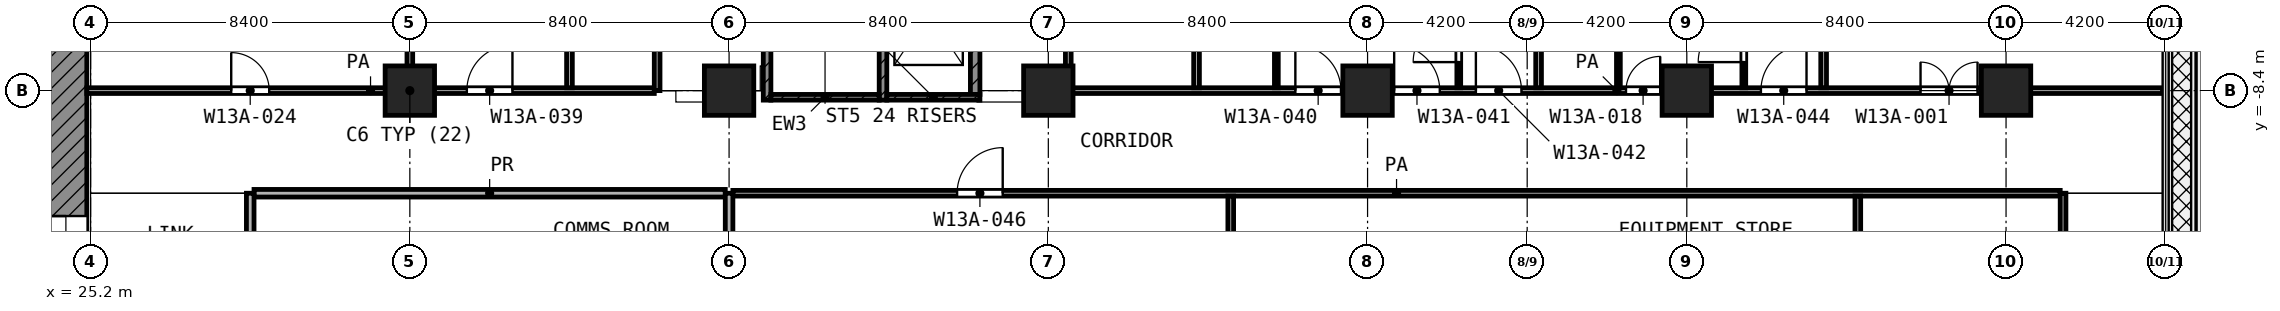
"""IFC4 building model, lengths in metres.
Left out: names, types, materials, properties, quantities, classifications, styles, units other than length and angle.
Written with IfcOpenShell. Run it as: python <this file> out.ifc"""

import sys

from ifc_helpers import new_model, si_unit, direction, frame, frame_2d, origin, origin_2d, place, context, subcontext, project, spatial, rectangle, extrude, element, fill, save


model = new_model("IFC4")
c1 = context("Model", 3, precision=1e-05, world=origin(), true_north=direction((0.0, 1.0)))
c2 = subcontext(c1, "Body", "Model", "MODEL_VIEW")
j1 = project(units=[si_unit("LENGTHUNIT", "METRE"), si_unit("PLANEANGLEUNIT", "RADIAN")], contexts=[c1])
p1 = place(None, origin())
s1 = spatial("IfcSite", under=j1, at=p1, CompositionType="ELEMENT")
p2 = place(p1, origin())
s2 = spatial("IfcBuilding", under=s1, at=p2, CompositionType="ELEMENT")
p3 = place(p2, frame((0.0, 0.0, 60.2)))
s3 = spatial("IfcBuildingStorey", under=s2, at=p3, CompositionType="ELEMENT", Elevation=60.2)
for number, where, z_axis, x_axis in (
    (1, (33.6, -8.4, 0.0), (0.0, 0.0, 1.0), (1.0, 0.0, 0.0)),
    (2, (42.0, -8.4, 0.0), (0.0, 0.0, 1.0), (1.0, 0.0, 0.0)),
    (3, (50.4, -8.4, 0.0), (0.0, 0.0, 1.0), (1.0, 0.0, 0.0)),
    (4, (58.8, -8.4, 0.0), (0.0, 0.0, 1.0), (1.0, 0.0, 0.0)),
    (5, (67.2, -8.4, 0.0), (0.0, 0.0, 1.0), (1.0, 0.0, 0.0)),
    (6, (75.6, -8.4, 0.0), (0.0, 0.0, 1.0), (1.0, 0.0, 0.0)),
):
    element("IfcColumn", number, at=place(p3, frame(where, z_axis=z_axis, x_axis=x_axis)), inside=s3, PredefinedType="COLUMN", context=c2, shape_type="SweptSolid", body=[
        extrude(rectangle(XDim=1.3, YDim=1.3, at=origin_2d()), origin(), (0.0, 0.0, 1.0), 4.2),
    ])
p4 = place(p3, frame((24.55, -24.0, 0.0), z_axis=(0.0, 0.0, 1.0), x_axis=(0.0, 1.0, 0.0)))
e7 = element("IfcWall", 7, at=p4, inside=s3, PredefinedType="SHEAR", context=c2, shape_type="SweptSolid", body=[
    extrude(rectangle(XDim=18.6, YDim=1.1, at=frame_2d((9.3, 0.0))), origin(), (0.0, 0.0, 1.0), 3.9),
])
p5 = place(p4, frame((10.5, 0.0, 0.0)))
e8 = element("IfcOpeningElement", 8, at=p5, cuts=e7, PredefinedType="OPENING", context=c2, shape_type="SweptSolid", body=[
    extrude(rectangle(XDim=1.8, YDim=2.1, at=frame_2d((0.9, 1.05))), frame((0.0, 0.56, 0.0), z_axis=(0.0, -1.0, 0.0), x_axis=(1.0, 0.0, 0.0)), (0.0, 0.0, 1.0), 1.12),
])
p6 = place(p3, frame((43.0, -8.65, 0.0), z_axis=(0.0, 0.0, 1.0), x_axis=(0.0, 1.0, 0.0)))
e9 = element("IfcWall", 9, at=p6, inside=s3, PredefinedType="SHEAR", context=c2, shape_type="SweptSolid", body=[
    extrude(rectangle(XDim=8.35, YDim=0.2, at=frame_2d((4.175, 0.0))), origin(), (0.0, 0.0, 1.0), 3.9),
])
p7 = place(p6, frame((7.0, 0.0, 0.0)))
e10 = element("IfcOpeningElement", 10, at=p7, cuts=e9, PredefinedType="OPENING", context=c2, shape_type="SweptSolid", body=[
    extrude(rectangle(XDim=1.1, YDim=2.1, at=frame_2d((0.55, 1.05))), frame((0.0, 0.11, 0.0), z_axis=(0.0, -1.0, 0.0), x_axis=(1.0, 0.0, 0.0)), (0.0, 0.0, 1.0), 0.22),
])
p8 = place(p3, frame((46.05, -8.65, 0.0), z_axis=(0.0, 0.0, 1.0), x_axis=(0.0, 1.0, 0.0)))
e11 = element("IfcWall", 11, at=p8, inside=s3, PredefinedType="SHEAR", context=c2, shape_type="SweptSolid", body=[
    extrude(rectangle(XDim=8.35, YDim=0.2, at=frame_2d((4.175, 0.0))), origin(), (0.0, 0.0, 1.0), 3.9),
])
p9 = place(p8, frame((7.0, 0.0, 0.0)))
e12 = element("IfcOpeningElement", 12, at=p9, cuts=e11, PredefinedType="OPENING", context=c2, shape_type="SweptSolid", body=[
    extrude(rectangle(XDim=1.1, YDim=2.1, at=frame_2d((0.55, 1.05))), frame((0.0, 0.11, 0.0), z_axis=(0.0, -1.0, 0.0), x_axis=(1.0, 0.0, 0.0)), (0.0, 0.0, 1.0), 0.22),
])
p10 = place(p3, frame((43.1, -8.575, 0.0), z_axis=(0.0, 0.0, 1.0), x_axis=(1.0, 0.0, 0.0)))
e13 = element("IfcWall", 13, at=p10, inside=s3, PredefinedType="SHEAR", context=c2, shape_type="SweptSolid", body=[
    extrude(rectangle(XDim=2.85, YDim=0.15, at=frame_2d((1.425, 0.0))), origin(), (0.0, 0.0, 1.0), 3.9),
])
p11 = place(p3, frame((46.15, -8.575, 0.0), z_axis=(0.0, 0.0, 1.0), x_axis=(1.0, 0.0, 0.0)))
e14 = element("IfcWall", 14, at=p11, inside=s3, PredefinedType="SHEAR", context=c2, shape_type="SweptSolid", body=[
    extrude(rectangle(XDim=2.45, YDim=0.15, at=frame_2d((1.225, 0.0))), origin(), (0.0, 0.0, 1.0), 3.9),
])
p12 = place(p3, frame((48.475, -8.5, 0.0), z_axis=(0.0, 0.0, 1.0), x_axis=(0.0, 1.0, 0.0)))
e15 = element("IfcWall", 15, at=p12, inside=s3, PredefinedType="SHEAR", context=c2, shape_type="SweptSolid", body=[
    extrude(rectangle(XDim=3.475, YDim=0.25, at=frame_2d((1.738, 0.0))), origin(), (0.0, 0.0, 1.0), 3.9),
])
p13 = place(p3, frame((56.4, -8.325, 0.0), z_axis=(0.0, 0.0, 1.0), x_axis=(0.0, 1.0, 0.0)))
e16 = element("IfcWall", 16, at=p13, inside=s3, PredefinedType="PARTITIONING", context=c2, shape_type="SweptSolid", body=[
    extrude(rectangle(XDim=2.625, YDim=0.1, at=frame_2d((1.312, 0.0))), origin(), (0.0, 0.0, 1.0), 3.9),
])
p14 = place(p3, frame((61.2, -8.325, 0.0), z_axis=(0.0, 0.0, 1.0), x_axis=(0.0, 1.0, 0.0)))
e17 = element("IfcWall", 17, at=p14, inside=s3, PredefinedType="PARTITIONING", context=c2, shape_type="SweptSolid", body=[
    extrude(rectangle(XDim=2.625, YDim=0.1, at=frame_2d((1.312, 0.0))), origin(), (0.0, 0.0, 1.0), 3.9),
])
p15 = place(p14, frame((0.675, 0.0, 0.0)))
e18 = element("IfcOpeningElement", 18, at=p15, cuts=e17, PredefinedType="OPENING", context=c2, shape_type="SweptSolid", body=[
    extrude(rectangle(XDim=1.2, YDim=2.1, at=frame_2d((0.6, 1.05))), frame((0.0, 0.06, 0.0), z_axis=(0.0, -1.0, 0.0), x_axis=(1.0, 0.0, 0.0)), (0.0, 0.0, 1.0), 0.12),
])
p16 = place(p3, frame((65.4, -8.325, 0.0), z_axis=(0.0, 0.0, 1.0), x_axis=(0.0, 1.0, 0.0)))
e19 = element("IfcWall", 19, at=p16, inside=s3, PredefinedType="PARTITIONING", context=c2, shape_type="SweptSolid", body=[
    extrude(rectangle(XDim=2.625, YDim=0.1, at=frame_2d((1.312, 0.0))), origin(), (0.0, 0.0, 1.0), 3.9),
])
p17 = place(p3, frame((68.7, -8.325, 0.0), z_axis=(0.0, 0.0, 1.0), x_axis=(0.0, 1.0, 0.0)))
e20 = element("IfcWall", 20, at=p17, inside=s3, PredefinedType="PARTITIONING", context=c2, shape_type="SweptSolid", body=[
    extrude(rectangle(XDim=2.625, YDim=0.1, at=frame_2d((1.312, 0.0))), origin(), (0.0, 0.0, 1.0), 3.9),
])
p18 = place(p17, frame((0.675, 0.0, 0.0)))
e21 = element("IfcOpeningElement", 21, at=p18, cuts=e20, PredefinedType="OPENING", context=c2, shape_type="SweptSolid", body=[
    extrude(rectangle(XDim=1.2, YDim=2.1, at=frame_2d((0.6, 1.05))), frame((0.0, 0.06, 0.0), z_axis=(0.0, -1.0, 0.0), x_axis=(1.0, 0.0, 0.0)), (0.0, 0.0, 1.0), 0.12),
])
p19 = place(p3, frame((42.1, -11.1, 0.0), z_axis=(0.0, 0.0, 1.0), x_axis=(1.0, 0.0, 0.0)))
e22 = element("IfcWall", 22, at=p19, inside=s3, PredefinedType="PARTITIONING", context=c2, shape_type="SweptSolid", body=[
    extrude(rectangle(XDim=34.925, YDim=0.15, at=frame_2d((17.462, 0.0))), origin(), (0.0, 0.0, 1.0), 3.9),
])
p20 = place(p19, frame((5.9, 0.0, 0.0)))
e23 = element("IfcOpeningElement", 23, at=p20, cuts=e22, PredefinedType="OPENING", context=c2, shape_type="SweptSolid", body=[
    extrude(rectangle(XDim=1.2, YDim=2.1, at=frame_2d((0.6, 1.05))), frame((0.0, 0.085, 0.0), z_axis=(0.0, -1.0, 0.0), x_axis=(1.0, 0.0, 0.0)), (0.0, 0.0, 1.0), 0.17),
])
p21 = place(p3, frame((25.1, -8.4, 0.0), z_axis=(0.0, 0.0, 1.0), x_axis=(1.0, 0.0, 0.0)))
e24 = element("IfcWall", 24, at=p21, inside=s3, PredefinedType="PARTITIONING", context=c2, shape_type="SweptSolid", body=[
    extrude(rectangle(XDim=14.932, YDim=0.15, at=frame_2d((7.466, 0.0))), origin(), (0.0, 0.0, 1.0), 3.9),
])
p22 = place(p21, frame((3.8, 0.0, 0.0)))
e25 = element("IfcOpeningElement", 25, at=p22, cuts=e24, PredefinedType="OPENING", context=c2, shape_type="SweptSolid", body=[
    extrude(rectangle(XDim=1.0, YDim=2.1, at=frame_2d((0.5, 1.05))), frame((0.0, 0.085, 0.0), z_axis=(0.0, -1.0, 0.0), x_axis=(1.0, 0.0, 0.0)), (0.0, 0.0, 1.0), 0.17),
])
p23 = place(p21, frame((10.0, 0.0, 0.0)))
e26 = element("IfcOpeningElement", 26, at=p23, cuts=e24, PredefinedType="OPENING", context=c2, shape_type="SweptSolid", body=[
    extrude(rectangle(XDim=1.2, YDim=2.1, at=frame_2d((0.6, 1.05))), frame((0.0, 0.085, 0.0), z_axis=(0.0, -1.0, 0.0), x_axis=(1.0, 0.0, 0.0)), (0.0, 0.0, 1.0), 0.17),
])
p24 = place(p3, frame((51.0, -8.4, 0.0), z_axis=(0.0, 0.0, 1.0), x_axis=(1.0, 0.0, 0.0)))
e27 = element("IfcWall", 27, at=p24, inside=s3, PredefinedType="PARTITIONING", context=c2, shape_type="SweptSolid", body=[
    extrude(rectangle(XDim=28.72, YDim=0.15, at=frame_2d((14.36, 0.0))), origin(), (0.0, 0.0, 1.0), 3.9),
])
p25 = place(p24, frame((5.9, 0.0, 0.0)))
e28 = element("IfcOpeningElement", 28, at=p25, cuts=e27, PredefinedType="OPENING", context=c2, shape_type="SweptSolid", body=[
    extrude(rectangle(XDim=1.2, YDim=2.1, at=frame_2d((0.6, 1.05))), frame((0.0, 0.085, 0.0), z_axis=(0.0, -1.0, 0.0), x_axis=(1.0, 0.0, 0.0)), (0.0, 0.0, 1.0), 0.17),
])
p26 = place(p24, frame((8.5, 0.0, 0.0)))
e29 = element("IfcOpeningElement", 29, at=p26, cuts=e27, PredefinedType="OPENING", context=c2, shape_type="SweptSolid", body=[
    extrude(rectangle(XDim=1.2, YDim=2.1, at=frame_2d((0.6, 1.05))), frame((0.0, 0.085, 0.0), z_axis=(0.0, -1.0, 0.0), x_axis=(1.0, 0.0, 0.0)), (0.0, 0.0, 1.0), 0.17),
])
p27 = place(p24, frame((10.65, 0.0, 0.0)))
e30 = element("IfcOpeningElement", 30, at=p27, cuts=e27, PredefinedType="OPENING", context=c2, shape_type="SweptSolid", body=[
    extrude(rectangle(XDim=1.2, YDim=2.1, at=frame_2d((0.6, 1.05))), frame((0.0, 0.085, 0.0), z_axis=(0.0, -1.0, 0.0), x_axis=(1.0, 0.0, 0.0)), (0.0, 0.0, 1.0), 0.17),
])
p28 = place(p24, frame((14.6, 0.0, 0.0)))
e31 = element("IfcOpeningElement", 31, at=p28, cuts=e27, PredefinedType="OPENING", context=c2, shape_type="SweptSolid", body=[
    extrude(rectangle(XDim=0.9, YDim=2.1, at=frame_2d((0.45, 1.05))), frame((0.0, 0.085, 0.0), z_axis=(0.0, -1.0, 0.0), x_axis=(1.0, 0.0, 0.0)), (0.0, 0.0, 1.0), 0.17),
])
p29 = place(p24, frame((18.15, 0.0, 0.0)))
e32 = element("IfcOpeningElement", 32, at=p29, cuts=e27, PredefinedType="OPENING", context=c2, shape_type="SweptSolid", body=[
    extrude(rectangle(XDim=1.2, YDim=2.1, at=frame_2d((0.6, 1.05))), frame((0.0, 0.085, 0.0), z_axis=(0.0, -1.0, 0.0), x_axis=(1.0, 0.0, 0.0)), (0.0, 0.0, 1.0), 0.17),
])
p30 = place(p24, frame((22.35, 0.0, 0.0)))
e33 = element("IfcOpeningElement", 33, at=p30, cuts=e27, PredefinedType="OPENING", context=c2, shape_type="SweptSolid", body=[
    extrude(rectangle(XDim=1.5, YDim=2.1, at=frame_2d((0.75, 1.05))), frame((0.0, 0.085, 0.0), z_axis=(0.0, -1.0, 0.0), x_axis=(1.0, 0.0, 0.0)), (0.0, 0.0, 1.0), 0.17),
])
for number, where, z_axis, x_axis in (
    (34, (33.6, -8.325, 0.0), (0.0, 0.0, 1.0), (0.0, 1.0, 0.0)),
    (35, (37.8, -8.325, 0.0), (0.0, 0.0, 1.0), (0.0, 1.0, 0.0)),
):
    element("IfcWall", number, at=place(p3, frame(where, z_axis=z_axis, x_axis=x_axis)), inside=s3, PredefinedType="PARTITIONING", context=c2, shape_type="SweptSolid", body=[
        extrude(rectangle(XDim=8.245, YDim=0.15, at=frame_2d((4.123, 0.0))), origin(), (0.0, 0.0, 1.0), 3.9),
    ])
p31 = place(p3, frame((40.107, -8.4, 0.0), z_axis=(0.0, 0.0, 1.0), x_axis=(0.0, 1.0, 0.0)))
e36 = element("IfcWall", 36, at=p31, inside=s3, PredefinedType="PARTITIONING", context=c2, shape_type="SweptSolid", body=[
    extrude(rectangle(XDim=8.048, YDim=0.15, at=frame_2d((4.024, 0.0))), origin(), (0.0, 0.0, 1.0), 3.9),
])
p32 = place(p31, frame((3.524, 0.0, 0.0)))
e37 = element("IfcOpeningElement", 37, at=p32, cuts=e36, PredefinedType="OPENING", context=c2, shape_type="SweptSolid", body=[
    extrude(rectangle(XDim=1.0, YDim=2.1, at=frame_2d((0.5, 1.05))), frame((0.0, 0.085, 0.0), z_axis=(0.0, -1.0, 0.0), x_axis=(1.0, 0.0, 0.0)), (0.0, 0.0, 1.0), 0.17),
])
p33 = place(p3, frame((50.925, -8.4, 0.0), z_axis=(0.0, 0.0, 1.0), x_axis=(0.0, 1.0, 0.0)))
e38 = element("IfcWall", 38, at=p33, inside=s3, PredefinedType="PARTITIONING", context=c2, shape_type="SweptSolid", body=[
    extrude(rectangle(XDim=6.548, YDim=0.15, at=frame_2d((3.274, 0.0))), origin(), (0.0, 0.0, 1.0), 3.9),
])
p34 = place(p33, frame((2.774, 0.0, 0.0)))
e39 = element("IfcOpeningElement", 39, at=p34, cuts=e38, PredefinedType="OPENING", context=c2, shape_type="SweptSolid", body=[
    extrude(rectangle(XDim=1.0, YDim=2.1, at=frame_2d((0.5, 1.05))), frame((0.0, 0.085, 0.0), z_axis=(0.0, -1.0, 0.0), x_axis=(1.0, 0.0, 0.0)), (0.0, 0.0, 1.0), 0.17),
])
p35 = place(p3, frame((54.3, -8.325, 0.0), z_axis=(0.0, 0.0, 1.0), x_axis=(0.0, 1.0, 0.0)))
e40 = element("IfcWall", 40, at=p35, inside=s3, PredefinedType="PARTITIONING", context=c2, shape_type="SweptSolid", body=[
    extrude(rectangle(XDim=8.245, YDim=0.15, at=frame_2d((4.123, 0.0))), origin(), (0.0, 0.0, 1.0), 3.9),
])
p36 = place(p3, frame((55.2, -14.025, 0.0), z_axis=(0.0, 0.0, 1.0), x_axis=(0.0, 1.0, 0.0)))
e41 = element("IfcWall", 41, at=p36, inside=s3, PredefinedType="PARTITIONING", context=c2, shape_type="SweptSolid", body=[
    extrude(rectangle(XDim=2.85, YDim=0.15, at=frame_2d((1.425, 0.0))), origin(), (0.0, 0.0, 1.0), 3.9),
])
for number, where, z_axis, x_axis in (
    (42, (63.3, -8.325, 0.0), (0.0, 0.0, 1.0), (0.0, 1.0, 0.0)),
    (43, (70.8, -8.325, 0.0), (0.0, 0.0, 1.0), (0.0, 1.0, 0.0)),
):
    element("IfcWall", number, at=place(p3, frame(where, z_axis=z_axis, x_axis=x_axis)), inside=s3, PredefinedType="PARTITIONING", context=c2, shape_type="SweptSolid", body=[
        extrude(rectangle(XDim=8.245, YDim=0.15, at=frame_2d((4.123, 0.0))), origin(), (0.0, 0.0, 1.0), 3.9),
    ])
p37 = place(p3, frame((71.7, -14.025, 0.0), z_axis=(0.0, 0.0, 1.0), x_axis=(0.0, 1.0, 0.0)))
e44 = element("IfcWall", 44, at=p37, inside=s3, PredefinedType="PARTITIONING", context=c2, shape_type="SweptSolid", body=[
    extrude(rectangle(XDim=2.85, YDim=0.15, at=frame_2d((1.425, 0.0))), origin(), (0.0, 0.0, 1.0), 3.9),
])
p38 = place(p3, frame((77.1, -14.1, 0.0), z_axis=(0.0, 0.0, 1.0), x_axis=(0.0, 1.0, 0.0)))
e45 = element("IfcWall", 45, at=p38, inside=s3, PredefinedType="PARTITIONING", context=c2, shape_type="SweptSolid", body=[
    extrude(rectangle(XDim=3.0, YDim=0.15, at=frame_2d((1.5, 0.0))), origin(), (0.0, 0.0, 1.0), 3.9),
])
p39 = place(p3, frame((29.5, -11.1, 0.0), z_axis=(0.0, 0.0, 1.0), x_axis=(1.0, 0.0, 0.0)))
e46 = element("IfcWall", 46, at=p39, inside=s3, PredefinedType="PARTITIONING", context=c2, shape_type="SweptSolid", body=[
    extrude(rectangle(XDim=12.4, YDim=0.2, at=frame_2d((6.2, 0.0))), origin(), (0.0, 0.0, 1.0), 3.9),
])
for number, where, z_axis, x_axis in (
    (47, (29.4, -14.1, 0.0), (0.0, 0.0, 1.0), (0.0, 1.0, 0.0)),
    (48, (42.0, -14.1, 0.0), (0.0, 0.0, 1.0), (0.0, 1.0, 0.0)),
):
    element("IfcWall", number, at=place(p3, frame(where, z_axis=z_axis, x_axis=x_axis)), inside=s3, PredefinedType="PARTITIONING", context=c2, shape_type="SweptSolid", body=[
        extrude(rectangle(XDim=3.0, YDim=0.2, at=frame_2d((1.5, 0.0))), origin(), (0.0, 0.0, 1.0), 3.9),
    ])
p40 = place(p5, origin())
e49 = element("IfcDoor", 49, at=p40, inside=s3, OperationType="DOUBLE_DOOR_SINGLE_SWING", PredefinedType="DOOR", context=c2, shape_type="SweptSolid", body=[
    extrude(rectangle(XDim=1.8, YDim=2.1, at=frame_2d((0.9, 1.05))), frame((0.0, 0.025, 0.0), z_axis=(0.0, -1.0, 0.0), x_axis=(1.0, 0.0, 0.0)), (0.0, 0.0, 1.0), 0.05),
])
fill(e8, e49)
p41 = place(p22, origin())
e50 = element("IfcDoor", 50, at=p41, inside=s3, OperationType="SINGLE_SWING_LEFT", PredefinedType="DOOR", context=c2, shape_type="SweptSolid", body=[
    extrude(rectangle(XDim=1.0, YDim=2.1, at=frame_2d((0.5, 1.05))), frame((0.0, 0.025, 0.0), z_axis=(0.0, -1.0, 0.0), x_axis=(1.0, 0.0, 0.0)), (0.0, 0.0, 1.0), 0.05),
])
fill(e25, e50)
p42 = place(p23, origin())
e51 = element("IfcDoor", 51, at=p42, inside=s3, OperationType="SINGLE_SWING_RIGHT", PredefinedType="DOOR", context=c2, shape_type="SweptSolid", body=[
    extrude(rectangle(XDim=1.2, YDim=2.1, at=frame_2d((0.6, 1.05))), frame((0.0, 0.025, 0.0), z_axis=(0.0, -1.0, 0.0), x_axis=(1.0, 0.0, 0.0)), (0.0, 0.0, 1.0), 0.05),
])
fill(e26, e51)
p43 = place(p25, origin())
e52 = element("IfcDoor", 52, at=p43, inside=s3, OperationType="SINGLE_SWING_LEFT", PredefinedType="DOOR", context=c2, shape_type="SweptSolid", body=[
    extrude(rectangle(XDim=1.2, YDim=2.1, at=frame_2d((0.6, 1.05))), frame((0.0, 0.025, 0.0), z_axis=(0.0, -1.0, 0.0), x_axis=(1.0, 0.0, 0.0)), (0.0, 0.0, 1.0), 0.05),
])
fill(e28, e52)
p44 = place(p26, origin())
e53 = element("IfcDoor", 53, at=p44, inside=s3, OperationType="SINGLE_SWING_LEFT", PredefinedType="DOOR", context=c2, shape_type="SweptSolid", body=[
    extrude(rectangle(XDim=1.2, YDim=2.1, at=frame_2d((0.6, 1.05))), frame((0.0, 0.025, 0.0), z_axis=(0.0, -1.0, 0.0), x_axis=(1.0, 0.0, 0.0)), (0.0, 0.0, 1.0), 0.05),
])
fill(e29, e53)
p45 = place(p27, origin())
e54 = element("IfcDoor", 54, at=p45, inside=s3, OperationType="SINGLE_SWING_LEFT", PredefinedType="DOOR", context=c2, shape_type="SweptSolid", body=[
    extrude(rectangle(XDim=1.2, YDim=2.1, at=frame_2d((0.6, 1.05))), frame((0.0, 0.025, 0.0), z_axis=(0.0, -1.0, 0.0), x_axis=(1.0, 0.0, 0.0)), (0.0, 0.0, 1.0), 0.05),
])
fill(e30, e54)
p46 = place(p15, origin())
e55 = element("IfcDoor", 55, at=p46, inside=s3, OperationType="SINGLE_SWING_LEFT", PredefinedType="DOOR", context=c2, shape_type="SweptSolid", body=[
    extrude(rectangle(XDim=1.2, YDim=2.1, at=frame_2d((0.6, 1.05))), frame((0.0, 0.025, 0.0), z_axis=(0.0, -1.0, 0.0), x_axis=(1.0, 0.0, 0.0)), (0.0, 0.0, 1.0), 0.05),
])
fill(e18, e55)
p47 = place(p28, origin())
e56 = element("IfcDoor", 56, at=p47, inside=s3, OperationType="SINGLE_SWING_RIGHT", PredefinedType="DOOR", context=c2, shape_type="SweptSolid", body=[
    extrude(rectangle(XDim=0.9, YDim=2.1, at=frame_2d((0.45, 1.05))), frame((0.0, 0.025, 0.0), z_axis=(0.0, -1.0, 0.0), x_axis=(1.0, 0.0, 0.0)), (0.0, 0.0, 1.0), 0.05),
])
fill(e31, e56)
p48 = place(p29, origin())
e57 = element("IfcDoor", 57, at=p48, inside=s3, OperationType="SINGLE_SWING_RIGHT", PredefinedType="DOOR", context=c2, shape_type="SweptSolid", body=[
    extrude(rectangle(XDim=1.2, YDim=2.1, at=frame_2d((0.6, 1.05))), frame((0.0, 0.025, 0.0), z_axis=(0.0, -1.0, 0.0), x_axis=(1.0, 0.0, 0.0)), (0.0, 0.0, 1.0), 0.05),
])
fill(e32, e57)
p49 = place(p18, origin())
e58 = element("IfcDoor", 58, at=p49, inside=s3, OperationType="SINGLE_SWING_LEFT", PredefinedType="DOOR", context=c2, shape_type="SweptSolid", body=[
    extrude(rectangle(XDim=1.2, YDim=2.1, at=frame_2d((0.6, 1.05))), frame((0.0, 0.025, 0.0), z_axis=(0.0, -1.0, 0.0), x_axis=(1.0, 0.0, 0.0)), (0.0, 0.0, 1.0), 0.05),
])
fill(e21, e58)
p50 = place(p30, origin())
e59 = element("IfcDoor", 59, at=p50, inside=s3, OperationType="DOUBLE_DOOR_SINGLE_SWING", PredefinedType="DOOR", context=c2, shape_type="SweptSolid", body=[
    extrude(rectangle(XDim=1.5, YDim=2.1, at=frame_2d((0.75, 1.05))), frame((0.0, 0.025, 0.0), z_axis=(0.0, -1.0, 0.0), x_axis=(1.0, 0.0, 0.0)), (0.0, 0.0, 1.0), 0.05),
])
fill(e33, e59)
p51 = place(p20, origin())
e60 = element("IfcDoor", 60, at=p51, inside=s3, OperationType="SINGLE_SWING_RIGHT", PredefinedType="DOOR", context=c2, shape_type="SweptSolid", body=[
    extrude(rectangle(XDim=1.2, YDim=2.1, at=frame_2d((0.6, 1.05))), frame((0.0, 0.025, 0.0), z_axis=(0.0, -1.0, 0.0), x_axis=(1.0, 0.0, 0.0)), (0.0, 0.0, 1.0), 0.05),
])
fill(e23, e60)
save(model, sys.argv[1])
